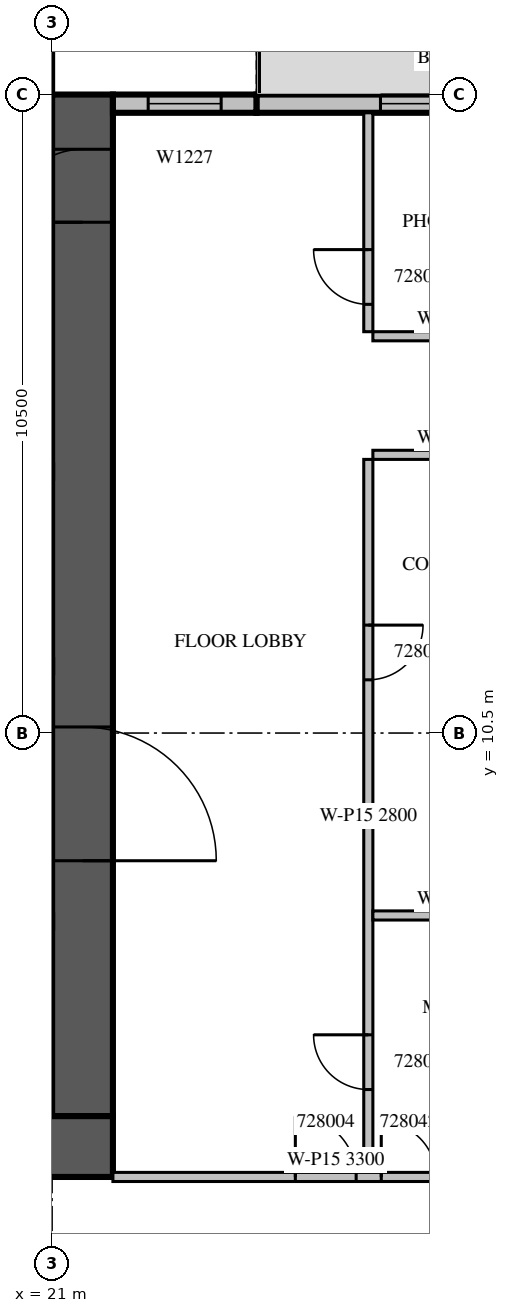
"""IFC4 building model, lengths in metres.
Left out: names, types, materials, properties, quantities, classifications, styles, units other than length and angle.
Written with IfcOpenShell. Run it as: python <this file> out.ifc"""

import sys

from ifc_helpers import new_model, si_unit, direction, frame, frame_2d, origin, place, context, subcontext, project, spatial, rectangle, extrude, source, transform, mapped, element, fill, save


model = new_model("IFC4")
c1 = context("Model", 3, precision=1e-05, world=origin(), true_north=direction((0.0, 1.0)))
c2 = subcontext(c1, "Body", "Model", "MODEL_VIEW")
j1 = project(units=[si_unit("LENGTHUNIT", "METRE"), si_unit("PLANEANGLEUNIT", "RADIAN")], contexts=[c1])
p1 = place(None, origin())
s1 = spatial("IfcSite", under=j1, at=p1, CompositionType="ELEMENT")
p2 = place(p1, origin())
s2 = spatial("IfcBuilding", under=s1, at=p2, CompositionType="ELEMENT")
p3 = place(p2, frame((0.0, 0.0, 128.7)))
s3 = spatial("IfcBuildingStorey", under=s2, at=p3, CompositionType="ELEMENT", Elevation=128.7)
m1 = source(origin(), c2, "Body", "SweptSolid", [
    extrude(rectangle(XDim=16.8, YDim=1.0, at=frame_2d((8.4, 0.0))), origin(), (0.0, 0.0, 1.0), 4.2),
])
p4 = place(p3, frame((21.5, 4.2, 0.0), z_axis=(0.0, 0.0, 1.0), x_axis=(0.0, 1.0, 0.0)))
e1 = element("IfcWall", 1, at=p4, inside=s3, PredefinedType="SHEAR", context=c2, shape_type="MappedRepresentation", body=[
    mapped(m1, transform((0.0, 0.0, 0.0), scale=1.0)),
])
m2 = source(origin(), c2, "Body", "SweptSolid", [
    extrude(rectangle(XDim=2.2, YDim=2.1, at=frame_2d((1.1, 1.05))), frame((0.0, 0.51, 0.0), z_axis=(0.0, -1.0, 0.0), x_axis=(1.0, 0.0, 0.0)), (0.0, 0.0, 1.0), 1.02),
])
p5 = place(p4, frame((4.2, 0.0, 0.0)))
e2 = element("IfcOpeningElement", 2, at=p5, cuts=e1, PredefinedType="OPENING", context=c2, shape_type="MappedRepresentation", body=[
    mapped(m2, transform((0.0, 0.0, 0.0), scale=1.0)),
])
m3 = source(origin(), c2, "Body", "SweptSolid", [
    extrude(rectangle(XDim=1.2, YDim=2.1, at=frame_2d((0.6, 1.05))), frame((0.0, 0.51, 0.0), z_axis=(0.0, -1.0, 0.0), x_axis=(1.0, 0.0, 0.0)), (0.0, 0.0, 1.0), 1.02),
])
p6 = place(p4, frame((14.7, 0.0, 0.0)))
e3 = element("IfcOpeningElement", 3, at=p6, cuts=e1, PredefinedType="OPENING", context=c2, shape_type="MappedRepresentation", body=[
    mapped(m3, transform((0.0, 0.0, 0.0), scale=1.0)),
])
m4 = source(origin(), c2, "Body", "SweptSolid", [
    extrude(rectangle(XDim=17.8, YDim=1.0, at=frame_2d((8.9, 0.0))), origin(), (0.0, 0.0, 1.0), 4.2),
])
p7 = place(p3, frame((4.2, 3.7, 0.0), z_axis=(0.0, 0.0, 1.0), x_axis=(1.0, 0.0, 0.0)))
e4 = element("IfcWall", 4, at=p7, inside=s3, PredefinedType="SHEAR", context=c2, shape_type="MappedRepresentation", body=[
    mapped(m4, transform((0.0, 0.0, 0.0), scale=1.0)),
])
p8 = place(p3, frame((28.875, 20.85, 0.0), z_axis=(0.0, 0.0, 1.0), x_axis=(-1.0, 0.0, 0.0)))
e5 = element("IfcWall", 5, at=p8, inside=s3, PredefinedType="STANDARD", context=c2, shape_type="SweptSolid", body=[
    extrude(rectangle(XDim=4.515, YDim=0.3, at=frame_2d((2.257, 0.0))), origin(), (0.0, 0.0, 1.0), 3.8),
])
m5 = source(origin(), c2, "Body", "SweptSolid", [
    extrude(rectangle(XDim=1.8, YDim=2.4, at=frame_2d((0.9, 1.2))), frame((0.0, 0.16, 0.0), z_axis=(0.0, -1.0, 0.0), x_axis=(1.0, 0.0, 0.0)), (0.0, 0.0, 1.0), 0.32),
])
p9 = place(p8, frame((0.675, 0.0, 0.0)))
e6 = element("IfcOpeningElement", 6, at=p9, cuts=e5, PredefinedType="OPENING", context=c2, shape_type="MappedRepresentation", body=[
    mapped(m5, transform((0.0, 0.0, 0.0), scale=1.0)),
])
m6 = source(origin(), c2, "Body", "SweptSolid", [
    extrude(rectangle(XDim=2.36, YDim=0.3, at=frame_2d((1.18, 0.0))), origin(), (0.0, 0.0, 1.0), 3.8),
])
p10 = place(p3, frame((24.36, 20.85, 0.0), z_axis=(0.0, 0.0, 1.0), x_axis=(-1.0, 0.0, 0.0)))
e7 = element("IfcWall", 7, at=p10, inside=s3, PredefinedType="STANDARD", context=c2, shape_type="MappedRepresentation", body=[
    mapped(m6, transform((0.0, 0.0, 0.0), scale=1.0)),
])
m7 = source(origin(), c2, "Body", "SweptSolid", [
    extrude(rectangle(XDim=1.2, YDim=2.7, at=frame_2d((0.6, 1.35))), frame((0.0, 0.16, 0.0), z_axis=(0.0, -1.0, 0.0), x_axis=(1.0, 0.0, 0.0)), (0.0, 0.0, 1.0), 0.32),
])
p11 = place(p10, frame((0.58, 0.0, 0.6)))
e8 = element("IfcOpeningElement", 8, at=p11, cuts=e7, PredefinedType="OPENING", context=c2, shape_type="MappedRepresentation", body=[
    mapped(m7, transform((0.0, 0.0, 0.0), scale=1.0)),
])
p12 = place(p3, frame((26.2, 15.0, 0.0), z_axis=(0.0, 0.0, 1.0), x_axis=(0.0, -1.0, 0.0)))
e9 = element("IfcWall", 9, at=p12, inside=s3, PredefinedType="PARTITIONING", context=c2, shape_type="SweptSolid", body=[
    extrude(rectangle(XDim=11.725, YDim=0.15, at=frame_2d((5.862, 0.0))), origin(), (0.0, 0.0, 1.0), 2.8),
])
m8 = source(origin(), c2, "Body", "SweptSolid", [
    extrude(rectangle(XDim=0.9, YDim=2.1, at=frame_2d((0.45, 1.05))), frame((0.0, 0.085, 0.0), z_axis=(0.0, -1.0, 0.0), x_axis=(1.0, 0.0, 0.0)), (0.0, 0.0, 1.0), 0.17),
])
p13 = place(p12, frame((9.463, 0.0, 0.0)))
e10 = element("IfcOpeningElement", 10, at=p13, cuts=e9, PredefinedType="OPENING", context=c2, shape_type="MappedRepresentation", body=[
    mapped(m8, transform((0.0, 0.0, 0.0), scale=1.0)),
])
p14 = place(p12, frame((2.725, 0.0, 0.0)))
e11 = element("IfcOpeningElement", 11, at=p14, cuts=e9, PredefinedType="OPENING", context=c2, shape_type="MappedRepresentation", body=[
    mapped(m8, transform((0.0, 0.0, 0.0), scale=1.0)),
])
m9 = source(origin(), c2, "Body", "SweptSolid", [
    extrude(rectangle(XDim=3.6, YDim=0.15, at=frame_2d((1.8, 0.0))), origin(), (0.0, 0.0, 1.0), 3.8),
])
p15 = place(p3, frame((26.2, 20.7, 0.0), z_axis=(0.0, 0.0, 1.0), x_axis=(0.0, -1.0, 0.0)))
e12 = element("IfcWall", 12, at=p15, inside=s3, PredefinedType="PARTITIONING", context=c2, shape_type="MappedRepresentation", body=[
    mapped(m9, transform((0.0, 0.0, 0.0), scale=1.0)),
])
p16 = place(p15, frame((2.25, 0.0, 0.0)))
e13 = element("IfcOpeningElement", 13, at=p16, cuts=e12, PredefinedType="OPENING", context=c2, shape_type="MappedRepresentation", body=[
    mapped(m8, transform((0.0, 0.0, 0.0), scale=1.0)),
])
p17 = place(p3, frame((29.325, 7.5, 0.0), z_axis=(0.0, 0.0, 1.0), x_axis=(-1.0, 0.0, 0.0)))
e14 = element("IfcWall", 14, at=p17, inside=s3, PredefinedType="PARTITIONING", context=c2, shape_type="SweptSolid", body=[
    extrude(rectangle(XDim=3.05, YDim=0.15, at=frame_2d((1.525, 0.0))), origin(), (0.0, 0.0, 1.0), 3.3),
])
m10 = source(origin(), c2, "Body", "SweptSolid", [
    extrude(rectangle(XDim=3.05, YDim=0.15, at=frame_2d((1.525, 0.0))), origin(), (0.0, 0.0, 1.0), 3.8),
])
for number, where, z_axis, x_axis in (
    (15, (29.325, 15.075, 0.0), (0.0, 0.0, 1.0), (-1.0, 0.0, 0.0)),
    (16, (26.275, 17.025, 0.0), (0.0, 0.0, 1.0), (1.0, 0.0, 0.0)),
):
    element("IfcWall", number, at=place(p3, frame(where, z_axis=z_axis, x_axis=x_axis)), inside=s3, PredefinedType="PARTITIONING", context=c2, shape_type="MappedRepresentation", body=[
        mapped(m10, transform((0.0, 0.0, 0.0), scale=1.0)),
    ])
m11 = source(origin(), c2, "Body", "SweptSolid", [
    extrude(rectangle(XDim=7.325, YDim=0.15, at=frame_2d((3.663, 0.0))), origin(), (0.0, 0.0, 1.0), 3.3),
])
p18 = place(p3, frame((22.0, 3.2, 0.0), z_axis=(0.0, 0.0, 1.0), x_axis=(1.0, 0.0, 0.0)))
e17 = element("IfcWall", 17, at=p18, inside=s3, PredefinedType="PARTITIONING", context=c2, shape_type="MappedRepresentation", body=[
    mapped(m11, transform((0.0, 0.0, 0.0), scale=1.0)),
])
m12 = source(origin(), c2, "Body", "SweptSolid", [
    extrude(rectangle(XDim=1.0, YDim=2.1, at=frame_2d((0.5, 1.05))), frame((0.0, 0.085, 0.0), z_axis=(0.0, -1.0, 0.0), x_axis=(1.0, 0.0, 0.0)), (0.0, 0.0, 1.0), 0.17),
])
p19 = place(p18, frame((3.0, 0.0, 0.0)))
e18 = element("IfcOpeningElement", 18, at=p19, cuts=e17, PredefinedType="OPENING", context=c2, shape_type="MappedRepresentation", body=[
    mapped(m12, transform((0.0, 0.0, 0.0), scale=1.0)),
])
p20 = place(p18, frame((4.413, 0.0, 0.0)))
e19 = element("IfcOpeningElement", 19, at=p20, cuts=e17, PredefinedType="OPENING", context=c2, shape_type="MappedRepresentation", body=[
    mapped(m8, transform((0.0, 0.0, 0.0), scale=1.0)),
])
m13 = source(origin(), c2, "Body", "SweptSolid", [
    extrude(rectangle(XDim=1.8, YDim=2.4, at=frame_2d((0.9, 1.2))), frame((0.0, 0.025, 0.0), z_axis=(0.0, -1.0, 0.0), x_axis=(1.0, 0.0, 0.0)), (0.0, 0.0, 1.0), 0.05),
])
p21 = place(p9, origin())
e20 = element("IfcDoor", 20, at=p21, inside=s3, OperationType="SLIDING_TO_LEFT", PredefinedType="DOOR", context=c2, shape_type="MappedRepresentation", body=[
    mapped(m13, transform((0.0, 0.0, 0.0), scale=1.0)),
])
fill(e6, e20)
m14 = source(origin(), c2, "Body", "SweptSolid", [
    extrude(rectangle(XDim=1.2, YDim=2.7, at=frame_2d((0.6, 1.35))), frame((0.0, 0.03, 0.0), z_axis=(0.0, -1.0, 0.0), x_axis=(1.0, 0.0, 0.0)), (0.0, 0.0, 1.0), 0.06),
])
p22 = place(p11, origin())
e21 = element("IfcWindow", 21, at=p22, inside=s3, PartitioningType="SINGLE_PANEL", PredefinedType="WINDOW", context=c2, shape_type="MappedRepresentation", body=[
    mapped(m14, transform((0.0, 0.0, 0.0), scale=1.0)),
])
fill(e8, e21)
m15 = source(origin(), c2, "Body", "SweptSolid", [
    extrude(rectangle(XDim=2.2, YDim=2.1, at=frame_2d((1.1, 1.05))), frame((0.0, 0.025, 0.0), z_axis=(0.0, -1.0, 0.0), x_axis=(1.0, 0.0, 0.0)), (0.0, 0.0, 1.0), 0.05),
])
p23 = place(p5, origin())
e22 = element("IfcDoor", 22, at=p23, inside=s3, OperationType="DOUBLE_DOOR_SINGLE_SWING", PredefinedType="DOOR", context=c2, shape_type="MappedRepresentation", body=[
    mapped(m15, transform((0.0, 0.0, 0.0), scale=1.0)),
])
fill(e2, e22)
m16 = source(origin(), c2, "Body", "SweptSolid", [
    extrude(rectangle(XDim=1.2, YDim=2.1, at=frame_2d((0.6, 1.05))), frame((0.0, 0.025, 0.0), z_axis=(0.0, -1.0, 0.0), x_axis=(1.0, 0.0, 0.0)), (0.0, 0.0, 1.0), 0.05),
])
p24 = place(p6, origin())
e23 = element("IfcDoor", 23, at=p24, inside=s3, OperationType="SINGLE_SWING_LEFT", PredefinedType="DOOR", context=c2, shape_type="MappedRepresentation", body=[
    mapped(m16, transform((0.0, 0.0, 0.0), scale=1.0)),
])
fill(e3, e23)
m17 = source(origin(), c2, "Body", "SweptSolid", [
    extrude(rectangle(XDim=0.9, YDim=2.1, at=frame_2d((0.45, 1.05))), frame((0.0, 0.025, 0.0), z_axis=(0.0, -1.0, 0.0), x_axis=(1.0, 0.0, 0.0)), (0.0, 0.0, 1.0), 0.05),
])
p25 = place(p13, origin())
e24 = element("IfcDoor", 24, at=p25, inside=s3, OperationType="SINGLE_SWING_RIGHT", PredefinedType="DOOR", context=c2, shape_type="MappedRepresentation", body=[
    mapped(m17, transform((0.0, 0.0, 0.0), scale=1.0)),
])
fill(e10, e24)
p26 = place(p14, origin())
e25 = element("IfcDoor", 25, at=p26, inside=s3, OperationType="SINGLE_SWING_LEFT", PredefinedType="DOOR", context=c2, shape_type="MappedRepresentation", body=[
    mapped(m17, transform((0.0, 0.0, 0.0), scale=1.0)),
])
fill(e11, e25)
p27 = place(p16, origin())
e26 = element("IfcDoor", 26, at=p27, inside=s3, OperationType="SINGLE_SWING_RIGHT", PredefinedType="DOOR", context=c2, shape_type="MappedRepresentation", body=[
    mapped(m17, transform((0.0, 0.0, 0.0), scale=1.0)),
])
fill(e13, e26)
m18 = source(origin(), c2, "Body", "SweptSolid", [
    extrude(rectangle(XDim=1.0, YDim=2.1, at=frame_2d((0.5, 1.05))), frame((0.0, 0.025, 0.0), z_axis=(0.0, -1.0, 0.0), x_axis=(1.0, 0.0, 0.0)), (0.0, 0.0, 1.0), 0.05),
])
p28 = place(p19, origin())
e27 = element("IfcDoor", 27, at=p28, inside=s3, OperationType="SINGLE_SWING_LEFT", PredefinedType="DOOR", context=c2, shape_type="MappedRepresentation", body=[
    mapped(m18, transform((0.0, 0.0, 0.0), scale=1.0)),
])
fill(e18, e27)
p29 = place(p20, origin())
e28 = element("IfcDoor", 28, at=p29, inside=s3, OperationType="SINGLE_SWING_LEFT", PredefinedType="DOOR", context=c2, shape_type="MappedRepresentation", body=[
    mapped(m17, transform((0.0, 0.0, 0.0), scale=1.0)),
])
fill(e19, e28)
save(model, sys.argv[1])
